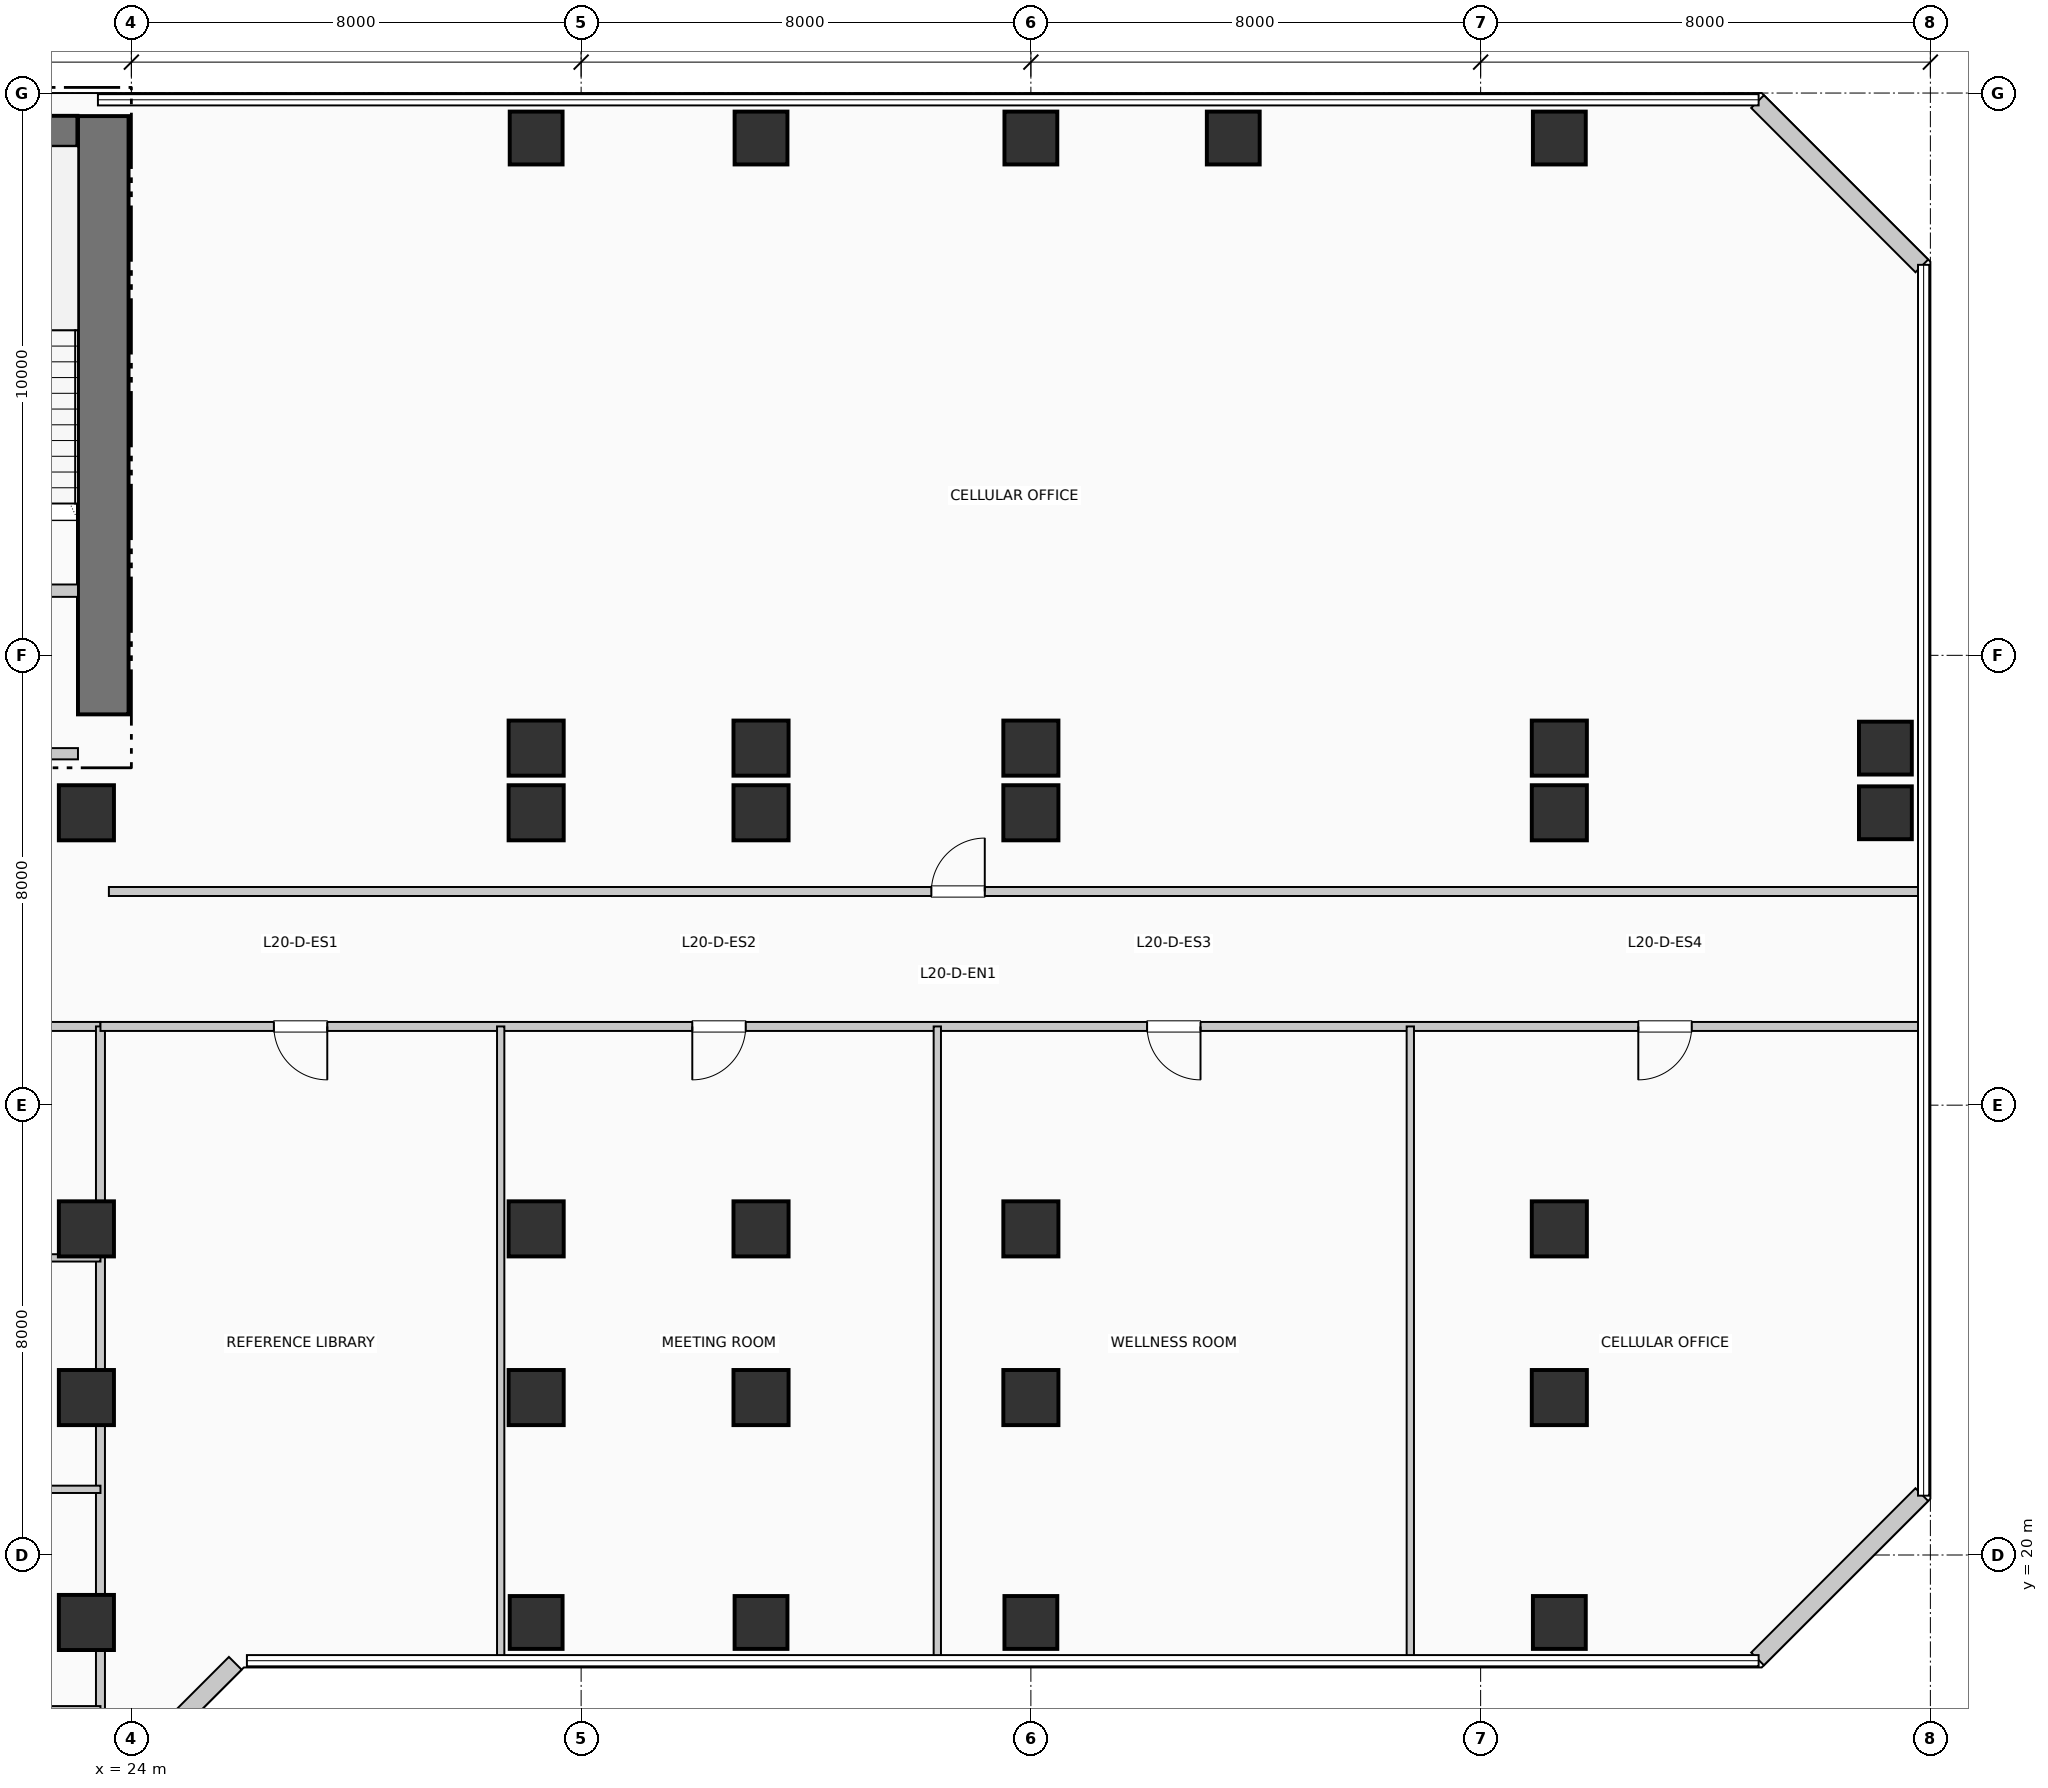
"""IFC4 building model, lengths in metres.
Left out: names, types, materials, properties, quantities, classifications, styles, units other than length and angle.
Written with IfcOpenShell. Run it as: python <this file> out.ifc"""

import sys

from ifc_helpers import new_model, si_unit, direction, frame, frame_2d, origin, origin_2d, place, context, subcontext, project, spatial, rectangle, extrude, element, fill, save


model = new_model("IFC4")
c1 = context("Model", 3, precision=1e-05, world=origin(), true_north=direction((0.0, 1.0)))
c2 = subcontext(c1, "Body", "Model", "MODEL_VIEW")
j1 = project(units=[si_unit("LENGTHUNIT", "METRE"), si_unit("PLANEANGLEUNIT", "RADIAN")], contexts=[c1])
p1 = place(None, origin())
s1 = spatial("IfcSite", under=j1, at=p1, CompositionType="ELEMENT")
p2 = place(p1, origin())
s2 = spatial("IfcBuilding", under=s1, at=p2, CompositionType="ELEMENT")
p3 = place(p2, frame((0.0, 0.0, 85.8)))
s3 = spatial("IfcBuildingStorey", under=s2, at=p3, CompositionType="ELEMENT", Elevation=85.8)
p4 = place(p3, frame((23.5, 34.95, 0.0), z_axis=(0.0, 0.0, 1.0), x_axis=(0.0, 1.0, 0.0)))
e1 = element("IfcWall", 1, at=p4, inside=s3, PredefinedType="SHEAR", context=c2, shape_type="SweptSolid", body=[
    extrude(rectangle(XDim=10.64, YDim=0.9, at=frame_2d((5.32, 0.0))), origin(), (0.0, 0.0, 1.0), 3.96),
])
p5 = place(p3, frame((19.35, 45.32, 0.0), z_axis=(0.0, 0.0, 1.0), x_axis=(1.0, 0.0, 0.0)))
e2 = element("IfcWall", 2, at=p5, inside=s3, PredefinedType="SHEAR", context=c2, shape_type="SweptSolid", body=[
    extrude(rectangle(XDim=3.69, YDim=0.55, at=frame_2d((1.845, 0.0))), origin(), (0.0, 0.0, 1.0), 3.96),
])
p6 = place(p5, frame((1.15, 0.0, 1.05)))
e3 = element("IfcOpeningElement", 3, at=p6, cuts=e2, PredefinedType="OPENING", context=c2, shape_type="SweptSolid", body=[
    extrude(rectangle(XDim=1.4, YDim=1.8, at=frame_2d((0.7, 0.9))), frame((0.0, 0.285, 0.0), z_axis=(0.0, -1.0, 0.0), x_axis=(1.0, 0.0, 0.0)), (0.0, 0.0, 1.0), 0.57),
])
for number, where, z_axis, x_axis in (
    (4, (23.2, 18.8, 0.0), (0.0, 0.0, 1.0), (1.0, 0.0, 0.0)),
    (5, (23.2, 22.8, 0.0), (0.0, 0.0, 1.0), (1.0, 0.0, 0.0)),
    (6, (23.2, 25.8, 0.0), (0.0, 0.0, 1.0), (1.0, 0.0, 0.0)),
    (7, (23.2, 33.2, 0.0), (0.0, 0.0, 1.0), (1.0, 0.0, 0.0)),
):
    element("IfcColumn", number, at=place(p3, frame(where, z_axis=z_axis, x_axis=x_axis)), inside=s3, PredefinedType="COLUMN", context=c2, shape_type="SweptSolid", body=[
        extrude(rectangle(XDim=0.98, YDim=0.98, at=origin_2d()), origin(), (0.0, 0.0, 1.0), 3.96),
    ])
p7 = place(p3, frame((31.2, 18.8, 0.0), z_axis=(0.0, 0.0, 1.0), x_axis=(1.0, 0.0, 0.0)))
e8 = element("IfcColumn", 8, at=p7, inside=s3, PredefinedType="COLUMN", context=c2, shape_type="SweptSolid", body=[
    extrude(rectangle(XDim=0.94, YDim=0.94, at=origin_2d()), origin(), (0.0, 0.0, 1.0), 3.96),
])
for number, where, z_axis, x_axis in (
    (9, (31.2, 22.8, 0.0), (0.0, 0.0, 1.0), (1.0, 0.0, 0.0)),
    (10, (31.2, 25.8, 0.0), (0.0, 0.0, 1.0), (1.0, 0.0, 0.0)),
    (11, (31.2, 33.2, 0.0), (0.0, 0.0, 1.0), (1.0, 0.0, 0.0)),
    (12, (31.2, 34.35, 0.0), (0.0, 0.0, 1.0), (1.0, 0.0, 0.0)),
):
    element("IfcColumn", number, at=place(p3, frame(where, z_axis=z_axis, x_axis=x_axis)), inside=s3, PredefinedType="COLUMN", context=c2, shape_type="SweptSolid", body=[
        extrude(rectangle(XDim=0.98, YDim=0.98, at=origin_2d()), origin(), (0.0, 0.0, 1.0), 3.96),
    ])
for number, where, z_axis, x_axis in (
    (13, (31.2, 45.2, 0.0), (0.0, 0.0, 1.0), (1.0, 0.0, 0.0)),
    (14, (35.2, 18.8, 0.0), (0.0, 0.0, 1.0), (1.0, 0.0, 0.0)),
):
    element("IfcColumn", number, at=place(p3, frame(where, z_axis=z_axis, x_axis=x_axis)), inside=s3, PredefinedType="COLUMN", context=c2, shape_type="SweptSolid", body=[
        extrude(rectangle(XDim=0.94, YDim=0.94, at=origin_2d()), origin(), (0.0, 0.0, 1.0), 3.96),
    ])
for number, where, z_axis, x_axis in (
    (15, (35.2, 22.8, 0.0), (0.0, 0.0, 1.0), (1.0, 0.0, 0.0)),
    (16, (35.2, 25.8, 0.0), (0.0, 0.0, 1.0), (1.0, 0.0, 0.0)),
    (17, (35.2, 33.2, 0.0), (0.0, 0.0, 1.0), (1.0, 0.0, 0.0)),
    (18, (35.2, 34.35, 0.0), (0.0, 0.0, 1.0), (1.0, 0.0, 0.0)),
):
    element("IfcColumn", number, at=place(p3, frame(where, z_axis=z_axis, x_axis=x_axis)), inside=s3, PredefinedType="COLUMN", context=c2, shape_type="SweptSolid", body=[
        extrude(rectangle(XDim=0.98, YDim=0.98, at=origin_2d()), origin(), (0.0, 0.0, 1.0), 3.96),
    ])
for number, where, z_axis, x_axis in (
    (19, (35.2, 45.2, 0.0), (0.0, 0.0, 1.0), (1.0, 0.0, 0.0)),
    (20, (40.0, 18.8, 0.0), (0.0, 0.0, 1.0), (1.0, 0.0, 0.0)),
):
    element("IfcColumn", number, at=place(p3, frame(where, z_axis=z_axis, x_axis=x_axis)), inside=s3, PredefinedType="COLUMN", context=c2, shape_type="SweptSolid", body=[
        extrude(rectangle(XDim=0.94, YDim=0.94, at=origin_2d()), origin(), (0.0, 0.0, 1.0), 3.96),
    ])
for number, where, z_axis, x_axis in (
    (21, (40.0, 22.8, 0.0), (0.0, 0.0, 1.0), (1.0, 0.0, 0.0)),
    (22, (40.0, 25.8, 0.0), (0.0, 0.0, 1.0), (1.0, 0.0, 0.0)),
    (23, (40.0, 33.2, 0.0), (0.0, 0.0, 1.0), (1.0, 0.0, 0.0)),
    (24, (40.0, 34.35, 0.0), (0.0, 0.0, 1.0), (1.0, 0.0, 0.0)),
):
    element("IfcColumn", number, at=place(p3, frame(where, z_axis=z_axis, x_axis=x_axis)), inside=s3, PredefinedType="COLUMN", context=c2, shape_type="SweptSolid", body=[
        extrude(rectangle(XDim=0.98, YDim=0.98, at=origin_2d()), origin(), (0.0, 0.0, 1.0), 3.96),
    ])
for number, where, z_axis, x_axis in (
    (25, (40.0, 45.2, 0.0), (0.0, 0.0, 1.0), (1.0, 0.0, 0.0)),
    (26, (43.6, 45.2, 0.0), (0.0, 0.0, 1.0), (1.0, 0.0, 0.0)),
    (27, (49.4, 18.8, 0.0), (0.0, 0.0, 1.0), (1.0, 0.0, 0.0)),
):
    element("IfcColumn", number, at=place(p3, frame(where, z_axis=z_axis, x_axis=x_axis)), inside=s3, PredefinedType="COLUMN", context=c2, shape_type="SweptSolid", body=[
        extrude(rectangle(XDim=0.94, YDim=0.94, at=origin_2d()), origin(), (0.0, 0.0, 1.0), 3.96),
    ])
for number, where, z_axis, x_axis in (
    (28, (49.4, 22.8, 0.0), (0.0, 0.0, 1.0), (1.0, 0.0, 0.0)),
    (29, (49.4, 25.8, 0.0), (0.0, 0.0, 1.0), (1.0, 0.0, 0.0)),
    (30, (49.4, 33.2, 0.0), (0.0, 0.0, 1.0), (1.0, 0.0, 0.0)),
    (31, (49.4, 34.35, 0.0), (0.0, 0.0, 1.0), (1.0, 0.0, 0.0)),
):
    element("IfcColumn", number, at=place(p3, frame(where, z_axis=z_axis, x_axis=x_axis)), inside=s3, PredefinedType="COLUMN", context=c2, shape_type="SweptSolid", body=[
        extrude(rectangle(XDim=0.98, YDim=0.98, at=origin_2d()), origin(), (0.0, 0.0, 1.0), 3.96),
    ])
for number, where, z_axis, x_axis in (
    (32, (49.4, 45.2, 0.0), (0.0, 0.0, 1.0), (1.0, 0.0, 0.0)),
    (33, (55.2, 33.2, 0.0), (0.0, 0.0, 1.0), (1.0, 0.0, 0.0)),
    (34, (55.2, 34.35, 0.0), (0.0, 0.0, 1.0), (1.0, 0.0, 0.0)),
):
    element("IfcColumn", number, at=place(p3, frame(where, z_axis=z_axis, x_axis=x_axis)), inside=s3, PredefinedType="COLUMN", context=c2, shape_type="SweptSolid", body=[
        extrude(rectangle(XDim=0.94, YDim=0.94, at=origin_2d()), origin(), (0.0, 0.0, 1.0), 3.96),
    ])
p8 = place(p3, frame((23.926, 16.152, 0.0), z_axis=(0.0, 0.0, 1.0), x_axis=(0.707106781187, 0.707106781187, 0.0)))
e35 = element("IfcWall", 35, at=p8, inside=s3, PredefinedType="SOLIDWALL", context=c2, shape_type="SweptSolid", body=[
    extrude(rectangle(XDim=2.718, YDim=0.32, at=frame_2d((1.359, 0.0))), origin(), (0.0, 0.0, 1.0), 3.71),
])
for number, where, z_axis, x_axis in (
    (36, (52.926, 18.152, 0.0), (0.0, 0.0, 1.0), (0.707, 0.707, 0.0)),
    (37, (55.848, 42.926, 0.0), (0.0, 0.0, 1.0), (-0.707, 0.707, 0.0)),
):
    element("IfcWall", number, at=place(p3, frame(where, z_axis=z_axis, x_axis=x_axis)), inside=s3, PredefinedType="SOLIDWALL", context=c2, shape_type="SweptSolid", body=[
        extrude(rectangle(XDim=4.133, YDim=0.32, at=frame_2d((2.066, 0.0))), origin(), (0.0, 0.0, 1.0), 3.71),
    ])
p9 = place(p3, frame((19.9, 37.15, 0.0), z_axis=(0.0, 0.0, 1.0), x_axis=(1.0, 0.0, 0.0)))
e38 = element("IfcWall", 38, at=p9, inside=s3, PredefinedType="PARTITIONING", context=c2, shape_type="SweptSolid", body=[
    extrude(rectangle(XDim=3.15, YDim=0.22, at=frame_2d((1.575, 0.0))), origin(), (0.0, 0.0, 1.0), 3.71),
])
p10 = place(p9, frame((2.05, 0.0, 0.0), z_axis=(0.0, 0.0, 1.0), x_axis=(-1.0, 0.0, 0.0)))
e39 = element("IfcOpeningElement", 39, at=p10, cuts=e38, PredefinedType="OPENING", context=c2, shape_type="SweptSolid", body=[
    extrude(rectangle(XDim=1.05, YDim=2.15, at=frame_2d((0.525, 1.075))), frame((0.0, 0.12, 0.0), z_axis=(0.0, -1.0, 0.0), x_axis=(1.0, 0.0, 0.0)), (0.0, 0.0, 1.0), 0.24),
])
p11 = place(p3, frame((19.8, 34.25, 0.0), z_axis=(0.0, 0.0, 1.0), x_axis=(1.0, 0.0, 0.0)))
e40 = element("IfcWall", 40, at=p11, inside=s3, PredefinedType="PARTITIONING", context=c2, shape_type="SweptSolid", body=[
    extrude(rectangle(XDim=3.25, YDim=0.2, at=frame_2d((1.625, 0.0))), origin(), (0.0, 0.0, 1.0), 3.71),
])
p12 = place(p11, frame((2.15, 0.0, 0.0), z_axis=(0.0, 0.0, 1.0), x_axis=(-1.0, 0.0, 0.0)))
e41 = element("IfcOpeningElement", 41, at=p12, cuts=e40, PredefinedType="OPENING", context=c2, shape_type="SweptSolid", body=[
    extrude(rectangle(XDim=1.1, YDim=2.15, at=frame_2d((0.55, 1.075))), frame((0.0, 0.11, 0.0), z_axis=(0.0, -1.0, 0.0), x_axis=(1.0, 0.0, 0.0)), (0.0, 0.0, 1.0), 0.22),
])
p13 = place(p3, frame((6.4, 29.4, 0.0), z_axis=(0.0, 0.0, 1.0), x_axis=(1.0, 0.0, 0.0)))
e42 = element("IfcWall", 42, at=p13, inside=s3, PredefinedType="PARTITIONING", context=c2, shape_type="SweptSolid", body=[
    extrude(rectangle(XDim=17.05, YDim=0.16, at=frame_2d((8.525, 0.0))), origin(), (0.0, 0.0, 1.0), 3.365),
])
p14 = place(p3, frame((23.45, 0.19, 0.0), z_axis=(0.0, 0.0, 1.0), x_axis=(0.0, 1.0, 0.0)))
e43 = element("IfcWall", 43, at=p14, inside=s3, PredefinedType="PARTITIONING", context=c2, shape_type="SweptSolid", body=[
    extrude(rectangle(XDim=29.21, YDim=0.16, at=frame_2d((14.605, 0.0))), origin(), (0.0, 0.0, 1.0), 2.995),
])
for number, where, z_axis, x_axis in (
    (44, (6.4, 17.248, 0.0), (0.0, 0.0, 1.0), (1.0, 0.0, 0.0)),
    (45, (6.4, 21.168, 0.0), (0.0, 0.0, 1.0), (1.0, 0.0, 0.0)),
    (46, (6.4, 25.284, 0.0), (0.0, 0.0, 1.0), (1.0, 0.0, 0.0)),
):
    element("IfcWall", number, at=place(p3, frame(where, z_axis=z_axis, x_axis=x_axis)), inside=s3, PredefinedType="PARTITIONING", context=c2, shape_type="SweptSolid", body=[
        extrude(rectangle(XDim=17.05, YDim=0.13, at=frame_2d((8.525, 0.0))), origin(), (0.0, 0.0, 1.0), 3.71),
    ])
p15 = place(p3, frame((23.45, 29.4, 0.0), z_axis=(0.0, 0.0, 1.0), x_axis=(1.0, 0.0, 0.0)))
e47 = element("IfcWall", 47, at=p15, inside=s3, PredefinedType="PARTITIONING", context=c2, shape_type="SweptSolid", body=[
    extrude(rectangle(XDim=32.36, YDim=0.16, at=frame_2d((16.18, 0.0))), origin(), (0.0, 0.0, 1.0), 3.365),
])
p16 = place(p15, frame((4.035, 0.0, 0.0), z_axis=(0.0, 0.0, 1.0), x_axis=(-1.0, 0.0, 0.0)))
e48 = element("IfcOpeningElement", 48, at=p16, cuts=e47, PredefinedType="OPENING", context=c2, shape_type="SweptSolid", body=[
    extrude(rectangle(XDim=0.95, YDim=2.15, at=frame_2d((0.475, 1.075))), frame((0.0, 0.09, 0.0), z_axis=(0.0, -1.0, 0.0), x_axis=(1.0, 0.0, 0.0)), (0.0, 0.0, 1.0), 0.18),
])
p17 = place(p15, frame((11.477, 0.0, 0.0), z_axis=(0.0, 0.0, 1.0), x_axis=(-1.0, 0.0, 0.0)))
e49 = element("IfcOpeningElement", 49, at=p17, cuts=e47, PredefinedType="OPENING", context=c2, shape_type="SweptSolid", body=[
    extrude(rectangle(XDim=0.95, YDim=2.15, at=frame_2d((0.475, 1.075))), frame((0.0, 0.09, 0.0), z_axis=(0.0, -1.0, 0.0), x_axis=(1.0, 0.0, 0.0)), (0.0, 0.0, 1.0), 0.18),
])
p18 = place(p15, frame((19.567, 0.0, 0.0), z_axis=(0.0, 0.0, 1.0), x_axis=(-1.0, 0.0, 0.0)))
e50 = element("IfcOpeningElement", 50, at=p18, cuts=e47, PredefinedType="OPENING", context=c2, shape_type="SweptSolid", body=[
    extrude(rectangle(XDim=0.95, YDim=2.15, at=frame_2d((0.475, 1.075))), frame((0.0, 0.09, 0.0), z_axis=(0.0, -1.0, 0.0), x_axis=(1.0, 0.0, 0.0)), (0.0, 0.0, 1.0), 0.18),
])
p19 = place(p15, frame((28.304, 0.0, 0.0), z_axis=(0.0, 0.0, 1.0), x_axis=(-1.0, 0.0, 0.0)))
e51 = element("IfcOpeningElement", 51, at=p19, cuts=e47, PredefinedType="OPENING", context=c2, shape_type="SweptSolid", body=[
    extrude(rectangle(XDim=0.95, YDim=2.15, at=frame_2d((0.475, 1.075))), frame((0.0, 0.09, 0.0), z_axis=(0.0, -1.0, 0.0), x_axis=(1.0, 0.0, 0.0)), (0.0, 0.0, 1.0), 0.18),
])
p20 = place(p3, frame((23.6, 31.8, 0.0), z_axis=(0.0, 0.0, 1.0), x_axis=(1.0, 0.0, 0.0)))
e52 = element("IfcWall", 52, at=p20, inside=s3, PredefinedType="PARTITIONING", context=c2, shape_type="SweptSolid", body=[
    extrude(rectangle(XDim=32.21, YDim=0.16, at=frame_2d((16.105, 0.0))), origin(), (0.0, 0.0, 1.0), 3.71),
])
p21 = place(p20, frame((14.63, 0.0, 0.0)))
e53 = element("IfcOpeningElement", 53, at=p21, cuts=e52, PredefinedType="OPENING", context=c2, shape_type="SweptSolid", body=[
    extrude(rectangle(XDim=0.95, YDim=2.15, at=frame_2d((0.475, 1.075))), frame((0.0, 0.09, 0.0), z_axis=(0.0, -1.0, 0.0), x_axis=(1.0, 0.0, 0.0)), (0.0, 0.0, 1.0), 0.18),
])
for number, where, z_axis, x_axis in (
    (54, (30.569, 18.19, 0.0), (0.0, 0.0, 1.0), (0.0, 1.0, 0.0)),
    (55, (38.336, 18.19, 0.0), (0.0, 0.0, 1.0), (0.0, 1.0, 0.0)),
    (56, (46.749, 18.19, 0.0), (0.0, 0.0, 1.0), (0.0, 1.0, 0.0)),
):
    element("IfcWall", number, at=place(p3, frame(where, z_axis=z_axis, x_axis=x_axis)), inside=s3, PredefinedType="PARTITIONING", context=c2, shape_type="SweptSolid", body=[
        extrude(rectangle(XDim=11.21, YDim=0.13, at=frame_2d((5.605, 0.0))), origin(), (0.0, 0.0, 1.0), 3.71),
    ])
p22 = place(p16, origin())
e57 = element("IfcDoor", 57, at=p22, inside=s3, OperationType="SINGLE_SWING_RIGHT", PredefinedType="DOOR", context=c2, shape_type="SweptSolid", body=[
    extrude(rectangle(XDim=0.95, YDim=2.15, at=frame_2d((0.475, 1.075))), frame((0.0, 0.025, 0.0), z_axis=(0.0, -1.0, 0.0), x_axis=(1.0, 0.0, 0.0)), (0.0, 0.0, 1.0), 0.05),
])
fill(e48, e57)
p23 = place(p17, origin())
e58 = element("IfcDoor", 58, at=p23, inside=s3, OperationType="SINGLE_SWING_LEFT", PredefinedType="DOOR", context=c2, shape_type="SweptSolid", body=[
    extrude(rectangle(XDim=0.95, YDim=2.15, at=frame_2d((0.475, 1.075))), frame((0.0, 0.025, 0.0), z_axis=(0.0, -1.0, 0.0), x_axis=(1.0, 0.0, 0.0)), (0.0, 0.0, 1.0), 0.05),
])
fill(e49, e58)
p24 = place(p18, origin())
e59 = element("IfcDoor", 59, at=p24, inside=s3, OperationType="SINGLE_SWING_RIGHT", PredefinedType="DOOR", context=c2, shape_type="SweptSolid", body=[
    extrude(rectangle(XDim=0.95, YDim=2.15, at=frame_2d((0.475, 1.075))), frame((0.0, 0.025, 0.0), z_axis=(0.0, -1.0, 0.0), x_axis=(1.0, 0.0, 0.0)), (0.0, 0.0, 1.0), 0.05),
])
fill(e50, e59)
p25 = place(p19, origin())
e60 = element("IfcDoor", 60, at=p25, inside=s3, OperationType="SINGLE_SWING_LEFT", PredefinedType="DOOR", context=c2, shape_type="SweptSolid", body=[
    extrude(rectangle(XDim=0.95, YDim=2.15, at=frame_2d((0.475, 1.075))), frame((0.0, 0.025, 0.0), z_axis=(0.0, -1.0, 0.0), x_axis=(1.0, 0.0, 0.0)), (0.0, 0.0, 1.0), 0.05),
])
fill(e51, e60)
p26 = place(p21, origin())
e61 = element("IfcDoor", 61, at=p26, inside=s3, OperationType="SINGLE_SWING_RIGHT", PredefinedType="DOOR", context=c2, shape_type="SweptSolid", body=[
    extrude(rectangle(XDim=0.95, YDim=2.15, at=frame_2d((0.475, 1.075))), frame((0.0, 0.025, 0.0), z_axis=(0.0, -1.0, 0.0), x_axis=(1.0, 0.0, 0.0)), (0.0, 0.0, 1.0), 0.05),
])
fill(e53, e61)
save(model, sys.argv[1])
